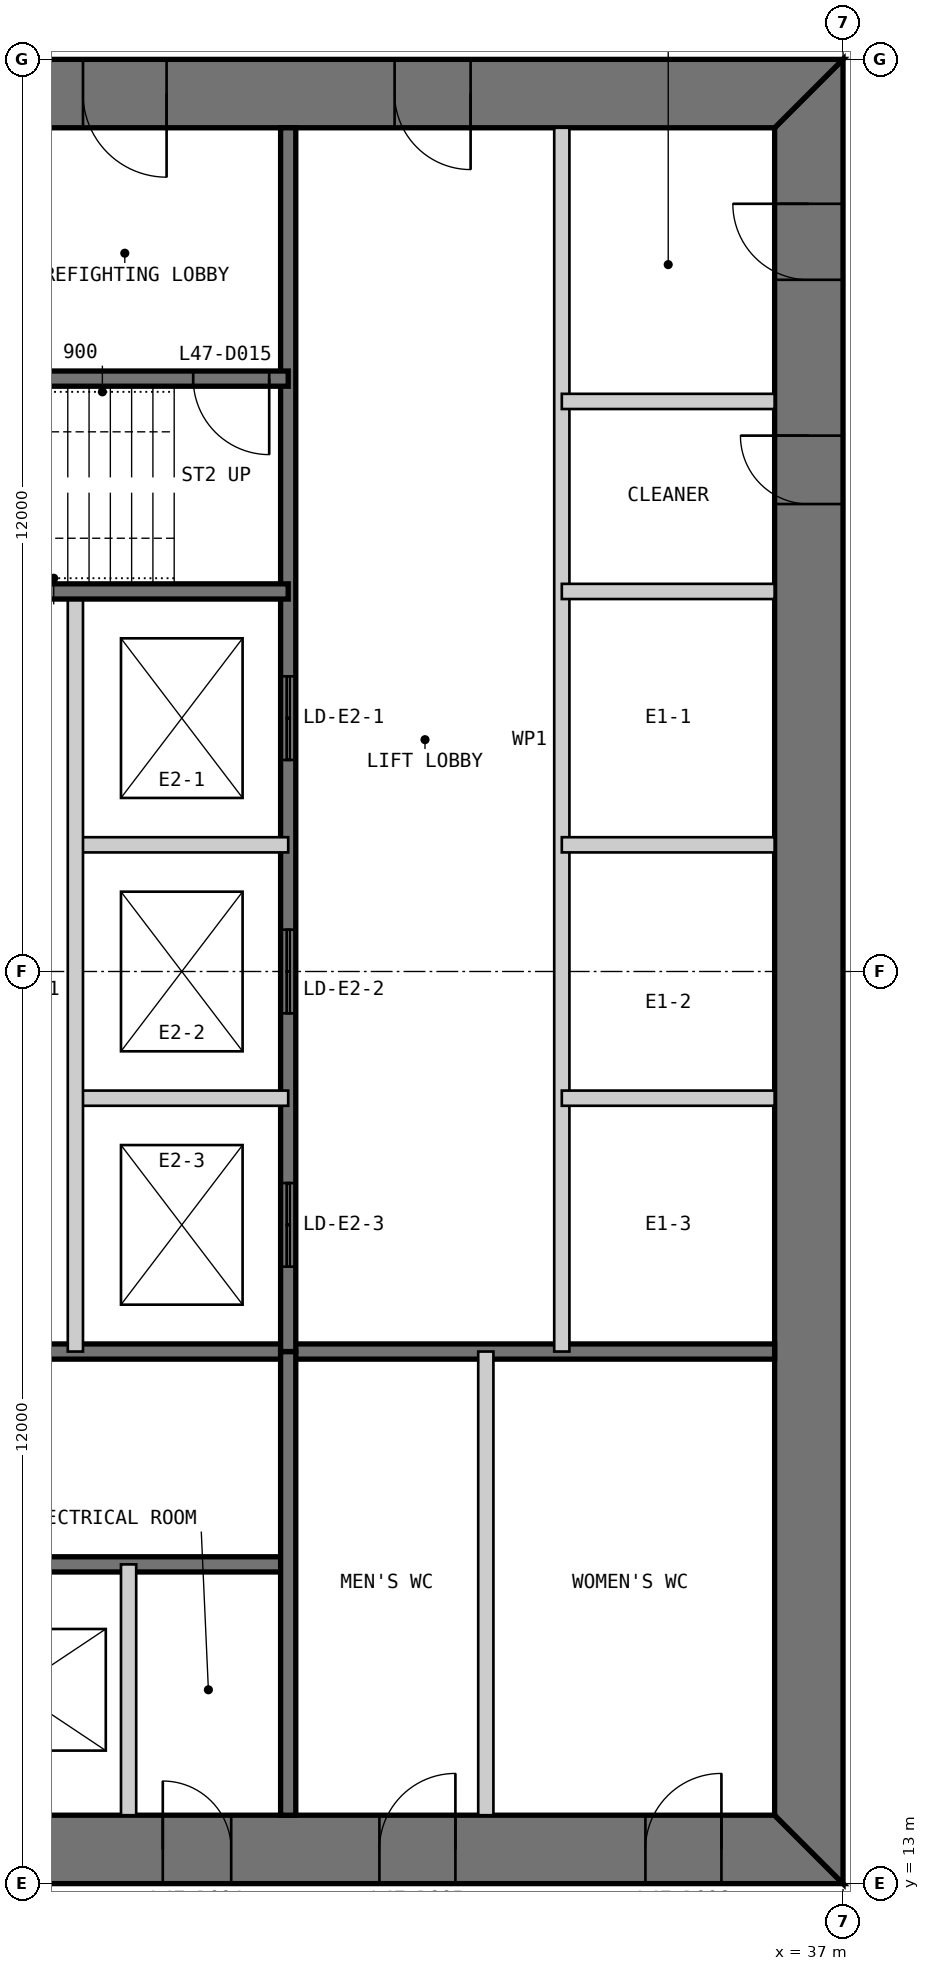
"""IFC4 building model, lengths in metres.
Left out: names, types, materials, properties, quantities, classifications, styles, units other than length and angle.
Written with IfcOpenShell. Run it as: python <this file> out.ifc"""

import sys

from ifc_helpers import new_model, si_unit, direction, frame, frame_2d, origin, place, context, subcontext, project, spatial, polyline, rectangle, outline, extrude, element, fill, save


model = new_model("IFC4")
c1 = context("Model", 3, precision=1e-05, world=origin(), true_north=direction((0.0, 1.0)))
c2 = subcontext(c1, "Body", "Model", "MODEL_VIEW")
j1 = project(units=[si_unit("LENGTHUNIT", "METRE"), si_unit("PLANEANGLEUNIT", "RADIAN")], contexts=[c1])
p1 = place(None, origin())
s1 = spatial("IfcSite", under=j1, at=p1, CompositionType="ELEMENT")
p2 = place(p1, origin())
s2 = spatial("IfcBuilding", under=s1, at=p2, CompositionType="ELEMENT")
p3 = place(p2, frame((0.0, 0.0, 201.8)))
s3 = spatial("IfcBuildingStorey", under=s2, at=p3, CompositionType="ELEMENT", Elevation=201.8)
p4 = place(p3, frame((13.0, 13.45, 0.0), z_axis=(0.0, 0.0, 1.0), x_axis=(1.0, 0.0, 0.0)))
e1 = element("IfcWall", 1, at=p4, inside=s3, PredefinedType="SHEAR", context=c2, shape_type="SweptSolid", body=[
    extrude(outline(polyline([(0.0, -0.45), (24.0, -0.45), (23.1, 0.45), (0.9, 0.45), (0.0, -0.45)])), origin(), (0.0, 0.0, 1.0), 4.0),
])
p5 = place(p4, frame((4.9, 0.0, 0.0)))
e2 = element("IfcOpeningElement", 2, at=p5, cuts=e1, PredefinedType="OPENING", context=c2, shape_type="SweptSolid", body=[
    extrude(rectangle(XDim=1.0, YDim=2.2, at=frame_2d((0.5, 1.1))), frame((0.0, 0.46, 0.0), z_axis=(0.0, -1.0, 0.0), x_axis=(1.0, 0.0, 0.0)), (0.0, 0.0, 1.0), 0.92),
])
p6 = place(p4, frame((8.9, 0.0, 0.0)))
e3 = element("IfcOpeningElement", 3, at=p6, cuts=e1, PredefinedType="OPENING", context=c2, shape_type="SweptSolid", body=[
    extrude(rectangle(XDim=1.1, YDim=2.2, at=frame_2d((0.55, 1.1))), frame((0.0, 0.46, 0.0), z_axis=(0.0, -1.0, 0.0), x_axis=(1.0, 0.0, 0.0)), (0.0, 0.0, 1.0), 0.92),
])
p7 = place(p4, frame((15.05, 0.0, 0.0)))
e4 = element("IfcOpeningElement", 4, at=p7, cuts=e1, PredefinedType="OPENING", context=c2, shape_type="SweptSolid", body=[
    extrude(rectangle(XDim=0.9, YDim=2.2, at=frame_2d((0.45, 1.1))), frame((0.0, 0.46, 0.0), z_axis=(0.0, -1.0, 0.0), x_axis=(1.0, 0.0, 0.0)), (0.0, 0.0, 1.0), 0.92),
])
p8 = place(p4, frame((17.9, 0.0, 0.0)))
e5 = element("IfcOpeningElement", 5, at=p8, cuts=e1, PredefinedType="OPENING", context=c2, shape_type="SweptSolid", body=[
    extrude(rectangle(XDim=1.0, YDim=2.2, at=frame_2d((0.5, 1.1))), frame((0.0, 0.46, 0.0), z_axis=(0.0, -1.0, 0.0), x_axis=(1.0, 0.0, 0.0)), (0.0, 0.0, 1.0), 0.92),
])
p9 = place(p4, frame((21.4, 0.0, 0.0)))
e6 = element("IfcOpeningElement", 6, at=p9, cuts=e1, PredefinedType="OPENING", context=c2, shape_type="SweptSolid", body=[
    extrude(rectangle(XDim=1.0, YDim=2.2, at=frame_2d((0.5, 1.1))), frame((0.0, 0.46, 0.0), z_axis=(0.0, -1.0, 0.0), x_axis=(1.0, 0.0, 0.0)), (0.0, 0.0, 1.0), 0.92),
])
p10 = place(p3, frame((36.55, 13.9, 0.0), z_axis=(0.0, 0.0, 1.0), x_axis=(0.0, 1.0, 0.0)))
e7 = element("IfcWall", 7, at=p10, inside=s3, PredefinedType="SHEAR", context=c2, shape_type="SweptSolid", body=[
    extrude(outline(polyline([(-0.9, -0.45), (23.1, -0.45), (22.2, 0.45), (0.0, 0.45), (-0.9, -0.45)])), origin(), (0.0, 0.0, 1.0), 4.0),
])
p11 = place(p10, frame((20.2, 0.0, 0.0)))
e8 = element("IfcOpeningElement", 8, at=p11, cuts=e7, PredefinedType="OPENING", context=c2, shape_type="SweptSolid", body=[
    extrude(rectangle(XDim=1.0, YDim=2.2, at=frame_2d((0.5, 1.1))), frame((0.0, 0.46, 0.0), z_axis=(0.0, -1.0, 0.0), x_axis=(1.0, 0.0, 0.0)), (0.0, 0.0, 1.0), 0.92),
])
p12 = place(p10, frame((17.25, 0.0, 0.0)))
e9 = element("IfcOpeningElement", 9, at=p12, cuts=e7, PredefinedType="OPENING", context=c2, shape_type="SweptSolid", body=[
    extrude(rectangle(XDim=0.9, YDim=2.2, at=frame_2d((0.45, 1.1))), frame((0.0, 0.46, 0.0), z_axis=(0.0, -1.0, 0.0), x_axis=(1.0, 0.0, 0.0)), (0.0, 0.0, 1.0), 0.92),
])
p13 = place(p3, frame((37.0, 36.55, 0.0), z_axis=(0.0, 0.0, 1.0), x_axis=(-1.0, 0.0, 0.0)))
e10 = element("IfcWall", 10, at=p13, inside=s3, PredefinedType="SHEAR", context=c2, shape_type="SweptSolid", body=[
    extrude(outline(polyline([(0.0, -0.45), (24.0, -0.45), (23.1, 0.45), (0.9, 0.45), (0.0, -0.45)])), origin(), (0.0, 0.0, 1.0), 4.0),
])
p14 = place(p13, frame((4.9, 0.0, 0.0)))
e11 = element("IfcOpeningElement", 11, at=p14, cuts=e10, PredefinedType="OPENING", context=c2, shape_type="SweptSolid", body=[
    extrude(rectangle(XDim=1.0, YDim=2.2, at=frame_2d((0.5, 1.1))), frame((0.0, 0.46, 0.0), z_axis=(0.0, -1.0, 0.0), x_axis=(1.0, 0.0, 0.0)), (0.0, 0.0, 1.0), 0.92),
])
p15 = place(p13, frame((8.9, 0.0, 0.0)))
e12 = element("IfcOpeningElement", 12, at=p15, cuts=e10, PredefinedType="OPENING", context=c2, shape_type="SweptSolid", body=[
    extrude(rectangle(XDim=1.1, YDim=2.2, at=frame_2d((0.55, 1.1))), frame((0.0, 0.46, 0.0), z_axis=(0.0, -1.0, 0.0), x_axis=(1.0, 0.0, 0.0)), (0.0, 0.0, 1.0), 0.92),
])
p16 = place(p13, frame((15.05, 0.0, 0.0)))
e13 = element("IfcOpeningElement", 13, at=p16, cuts=e10, PredefinedType="OPENING", context=c2, shape_type="SweptSolid", body=[
    extrude(rectangle(XDim=0.9, YDim=2.2, at=frame_2d((0.45, 1.1))), frame((0.0, 0.46, 0.0), z_axis=(0.0, -1.0, 0.0), x_axis=(1.0, 0.0, 0.0)), (0.0, 0.0, 1.0), 0.92),
])
p17 = place(p13, frame((17.9, 0.0, 0.0)))
e14 = element("IfcOpeningElement", 14, at=p17, cuts=e10, PredefinedType="OPENING", context=c2, shape_type="SweptSolid", body=[
    extrude(rectangle(XDim=1.0, YDim=2.2, at=frame_2d((0.5, 1.1))), frame((0.0, 0.46, 0.0), z_axis=(0.0, -1.0, 0.0), x_axis=(1.0, 0.0, 0.0)), (0.0, 0.0, 1.0), 0.92),
])
p18 = place(p13, frame((21.4, 0.0, 0.0)))
e15 = element("IfcOpeningElement", 15, at=p18, cuts=e10, PredefinedType="OPENING", context=c2, shape_type="SweptSolid", body=[
    extrude(rectangle(XDim=1.0, YDim=2.2, at=frame_2d((0.5, 1.1))), frame((0.0, 0.46, 0.0), z_axis=(0.0, -1.0, 0.0), x_axis=(1.0, 0.0, 0.0)), (0.0, 0.0, 1.0), 0.92),
])
p19 = place(p3, frame((20.3, 17.2, 0.0), z_axis=(0.0, 0.0, 1.0), x_axis=(1.0, 0.0, 0.0)))
e16 = element("IfcWall", 16, at=p19, inside=s3, PredefinedType="SOLIDWALL", context=c2, shape_type="SweptSolid", body=[
    extrude(rectangle(XDim=9.4, YDim=0.2, at=frame_2d((4.7, 0.0))), origin(), (0.0, 0.0, 1.0), 3.8),
])
p20 = place(p19, frame((0.25, 0.0, 0.0)))
e17 = element("IfcOpeningElement", 17, at=p20, cuts=e16, PredefinedType="OPENING", context=c2, shape_type="SweptSolid", body=[
    extrude(rectangle(XDim=1.0, YDim=2.2, at=frame_2d((0.5, 1.1))), frame((0.0, 0.11, 0.0), z_axis=(0.0, -1.0, 0.0), x_axis=(1.0, 0.0, 0.0)), (0.0, 0.0, 1.0), 0.22),
])
p21 = place(p3, frame((20.3, 20.0, 0.0), z_axis=(0.0, 0.0, 1.0), x_axis=(1.0, 0.0, 0.0)))
e18 = element("IfcWall", 18, at=p21, inside=s3, PredefinedType="SOLIDWALL", context=c2, shape_type="SweptSolid", body=[
    extrude(rectangle(XDim=15.8, YDim=0.2, at=frame_2d((7.9, 0.0))), origin(), (0.0, 0.0, 1.0), 3.8),
])
p22 = place(p3, frame((27.6, 13.9, 0.0), z_axis=(0.0, 0.0, 1.0), x_axis=(0.0, 1.0, 0.0)))
e19 = element("IfcWall", 19, at=p22, inside=s3, PredefinedType="PARTITIONING", context=c2, shape_type="SweptSolid", body=[
    extrude(rectangle(XDim=3.3, YDim=0.2, at=frame_2d((1.65, 0.0))), origin(), (0.0, 0.0, 1.0), 3.8),
])
p23 = place(p3, frame((29.7, 13.9, 0.0), z_axis=(0.0, 0.0, 1.0), x_axis=(0.0, 1.0, 0.0)))
e20 = element("IfcWall", 20, at=p23, inside=s3, PredefinedType="SOLIDWALL", context=c2, shape_type="SweptSolid", body=[
    extrude(rectangle(XDim=6.1, YDim=0.2, at=frame_2d((3.05, 0.0))), origin(), (0.0, 0.0, 1.0), 3.8),
])
p24 = place(p3, frame((32.3, 13.9, 0.0), z_axis=(0.0, 0.0, 1.0), x_axis=(0.0, 1.0, 0.0)))
e21 = element("IfcWall", 21, at=p24, inside=s3, PredefinedType="PARTITIONING", context=c2, shape_type="SweptSolid", body=[
    extrude(rectangle(XDim=6.1, YDim=0.2, at=frame_2d((3.05, 0.0))), origin(), (0.0, 0.0, 1.0), 3.8),
])
p25 = place(p3, frame((33.3, 36.1, 0.0), z_axis=(0.0, 0.0, 1.0), x_axis=(0.0, -1.0, 0.0)))
e22 = element("IfcWall", 22, at=p25, inside=s3, PredefinedType="PARTITIONING", context=c2, shape_type="SweptSolid", body=[
    extrude(rectangle(XDim=16.1, YDim=0.2, at=frame_2d((8.05, 0.0))), origin(), (0.0, 0.0, 1.0), 3.8),
])
p26 = place(p3, frame((29.7, 36.1, 0.0), z_axis=(0.0, 0.0, 1.0), x_axis=(0.0, -1.0, 0.0)))
e23 = element("IfcWall", 23, at=p26, inside=s3, PredefinedType="SOLIDWALL", context=c2, shape_type="SweptSolid", body=[
    extrude(rectangle(XDim=16.1, YDim=0.2, at=frame_2d((8.05, 0.0))), origin(), (0.0, 0.0, 1.0), 3.8),
])
p27 = place(p26, frame((7.217, 0.0, 0.0)))
e24 = element("IfcOpeningElement", 24, at=p27, cuts=e23, PredefinedType="OPENING", context=c2, shape_type="SweptSolid", body=[
    extrude(rectangle(XDim=1.1, YDim=2.2, at=frame_2d((0.55, 1.1))), frame((0.0, 0.11, 0.0), z_axis=(0.0, -1.0, 0.0), x_axis=(1.0, 0.0, 0.0)), (0.0, 0.0, 1.0), 0.22),
])
p28 = place(p26, frame((10.55, 0.0, 0.0)))
e25 = element("IfcOpeningElement", 25, at=p28, cuts=e23, PredefinedType="OPENING", context=c2, shape_type="SweptSolid", body=[
    extrude(rectangle(XDim=1.1, YDim=2.2, at=frame_2d((0.55, 1.1))), frame((0.0, 0.11, 0.0), z_axis=(0.0, -1.0, 0.0), x_axis=(1.0, 0.0, 0.0)), (0.0, 0.0, 1.0), 0.22),
])
p29 = place(p26, frame((13.883, 0.0, 0.0)))
e26 = element("IfcOpeningElement", 26, at=p29, cuts=e23, PredefinedType="OPENING", context=c2, shape_type="SweptSolid", body=[
    extrude(rectangle(XDim=1.1, YDim=2.2, at=frame_2d((0.55, 1.1))), frame((0.0, 0.11, 0.0), z_axis=(0.0, -1.0, 0.0), x_axis=(1.0, 0.0, 0.0)), (0.0, 0.0, 1.0), 0.22),
])
for number, where, z_axis, x_axis in (
    (27, (36.1, 30.0, 0.0), (0.0, 0.0, 1.0), (-1.0, 0.0, 0.0)),
    (28, (36.1, 26.667, 0.0), (0.0, 0.0, 1.0), (-1.0, 0.0, 0.0)),
    (29, (36.1, 23.333, 0.0), (0.0, 0.0, 1.0), (-1.0, 0.0, 0.0)),
    (30, (29.7, 26.667, 0.0), (0.0, 0.0, 1.0), (-1.0, 0.0, 0.0)),
    (31, (29.7, 23.333, 0.0), (0.0, 0.0, 1.0), (-1.0, 0.0, 0.0)),
):
    element("IfcWall", number, at=place(p3, frame(where, z_axis=z_axis, x_axis=x_axis)), inside=s3, PredefinedType="PARTITIONING", context=c2, shape_type="SweptSolid", body=[
        extrude(rectangle(XDim=2.8, YDim=0.2, at=frame_2d((1.4, 0.0))), origin(), (0.0, 0.0, 1.0), 3.8),
    ])
p30 = place(p3, frame((26.9, 30.0, 0.0), z_axis=(0.0, 0.0, 1.0), x_axis=(0.0, -1.0, 0.0)))
e32 = element("IfcWall", 32, at=p30, inside=s3, PredefinedType="PARTITIONING", context=c2, shape_type="SweptSolid", body=[
    extrude(rectangle(XDim=10.0, YDim=0.2, at=frame_2d((5.0, 0.0))), origin(), (0.0, 0.0, 1.0), 3.8),
])
p31 = place(p3, frame((29.7, 32.8, 0.0), z_axis=(0.0, 0.0, 1.0), x_axis=(-1.0, 0.0, 0.0)))
e33 = element("IfcWall", 33, at=p31, inside=s3, PredefinedType="SOLIDWALL", context=c2, shape_type="SweptSolid", body=[
    extrude(rectangle(XDim=9.4, YDim=0.2, at=frame_2d((4.7, 0.0))), origin(), (0.0, 0.0, 1.0), 3.8),
])
p32 = place(p31, frame((0.25, 0.0, 0.0)))
e34 = element("IfcOpeningElement", 34, at=p32, cuts=e33, PredefinedType="OPENING", context=c2, shape_type="SweptSolid", body=[
    extrude(rectangle(XDim=1.0, YDim=2.2, at=frame_2d((0.5, 1.1))), frame((0.0, 0.11, 0.0), z_axis=(0.0, -1.0, 0.0), x_axis=(1.0, 0.0, 0.0)), (0.0, 0.0, 1.0), 0.22),
])
p33 = place(p3, frame((29.7, 30.0, 0.0), z_axis=(0.0, 0.0, 1.0), x_axis=(-1.0, 0.0, 0.0)))
e35 = element("IfcWall", 35, at=p33, inside=s3, PredefinedType="SOLIDWALL", context=c2, shape_type="SweptSolid", body=[
    extrude(rectangle(XDim=15.8, YDim=0.2, at=frame_2d((7.9, 0.0))), origin(), (0.0, 0.0, 1.0), 3.8),
])
p34 = place(p3, frame((36.1, 32.5, 0.0), z_axis=(0.0, 0.0, 1.0), x_axis=(-1.0, 0.0, 0.0)))
e36 = element("IfcWall", 36, at=p34, inside=s3, PredefinedType="PARTITIONING", context=c2, shape_type="SweptSolid", body=[
    extrude(rectangle(XDim=2.8, YDim=0.2, at=frame_2d((1.4, 0.0))), origin(), (0.0, 0.0, 1.0), 3.8),
])
p35 = place(p7, origin())
e37 = element("IfcDoor", 37, at=p35, inside=s3, OperationType="SINGLE_SWING_LEFT", PredefinedType="DOOR", context=c2, shape_type="SweptSolid", body=[
    extrude(rectangle(XDim=0.9, YDim=2.2, at=frame_2d((0.45, 1.1))), frame((0.0, 0.025, 0.0), z_axis=(0.0, -1.0, 0.0), x_axis=(1.0, 0.0, 0.0)), (0.0, 0.0, 1.0), 0.05),
    extrude(outline(polyline([(0.0, 0.0), (0.04, 0.0), (0.04, 2.16), (0.86, 2.16), (0.86, 0.0), (0.9, 0.0), (0.9, 2.2), (0.0, 2.2), (0.0, 0.0)])), frame((0.0, 0.3, 0.0), z_axis=(0.0, -1.0, 0.0), x_axis=(1.0, 0.0, 0.0)), (0.0, 0.0, 1.0), 0.6),
])
fill(e4, e37)
p36 = place(p8, origin())
e38 = element("IfcDoor", 38, at=p36, inside=s3, OperationType="SINGLE_SWING_RIGHT", PredefinedType="DOOR", context=c2, shape_type="SweptSolid", body=[
    extrude(rectangle(XDim=1.0, YDim=2.2, at=frame_2d((0.5, 1.1))), frame((0.0, 0.025, 0.0), z_axis=(0.0, -1.0, 0.0), x_axis=(1.0, 0.0, 0.0)), (0.0, 0.0, 1.0), 0.05),
    extrude(outline(polyline([(0.0, 0.0), (0.04, 0.0), (0.04, 2.16), (0.96, 2.16), (0.96, 0.0), (1.0, 0.0), (1.0, 2.2), (0.0, 2.2), (0.0, 0.0)])), frame((0.0, 0.3, 0.0), z_axis=(0.0, -1.0, 0.0), x_axis=(1.0, 0.0, 0.0)), (0.0, 0.0, 1.0), 0.6),
])
fill(e5, e38)
p37 = place(p9, origin())
e39 = element("IfcDoor", 39, at=p37, inside=s3, OperationType="SINGLE_SWING_RIGHT", PredefinedType="DOOR", context=c2, shape_type="SweptSolid", body=[
    extrude(rectangle(XDim=1.0, YDim=2.2, at=frame_2d((0.5, 1.1))), frame((0.0, 0.025, 0.0), z_axis=(0.0, -1.0, 0.0), x_axis=(1.0, 0.0, 0.0)), (0.0, 0.0, 1.0), 0.05),
    extrude(outline(polyline([(0.0, 0.0), (0.04, 0.0), (0.04, 2.16), (0.96, 2.16), (0.96, 0.0), (1.0, 0.0), (1.0, 2.2), (0.0, 2.2), (0.0, 0.0)])), frame((0.0, 0.3, 0.0), z_axis=(0.0, -1.0, 0.0), x_axis=(1.0, 0.0, 0.0)), (0.0, 0.0, 1.0), 0.6),
])
fill(e6, e39)
p38 = place(p14, origin())
e40 = element("IfcDoor", 40, at=p38, inside=s3, OperationType="SINGLE_SWING_LEFT", PredefinedType="DOOR", context=c2, shape_type="SweptSolid", body=[
    extrude(rectangle(XDim=1.0, YDim=2.2, at=frame_2d((0.5, 1.1))), frame((0.0, 0.025, 0.0), z_axis=(0.0, -1.0, 0.0), x_axis=(1.0, 0.0, 0.0)), (0.0, 0.0, 1.0), 0.05),
    extrude(outline(polyline([(0.0, 0.0), (0.04, 0.0), (0.04, 2.16), (0.96, 2.16), (0.96, 0.0), (1.0, 0.0), (1.0, 2.2), (0.0, 2.2), (0.0, 0.0)])), frame((0.0, 0.3, 0.0), z_axis=(0.0, -1.0, 0.0), x_axis=(1.0, 0.0, 0.0)), (0.0, 0.0, 1.0), 0.6),
])
fill(e11, e40)
p39 = place(p15, origin())
e41 = element("IfcDoor", 41, at=p39, inside=s3, OperationType="SINGLE_SWING_LEFT", PredefinedType="DOOR", context=c2, shape_type="SweptSolid", body=[
    extrude(rectangle(XDim=1.1, YDim=2.2, at=frame_2d((0.55, 1.1))), frame((0.0, 0.025, 0.0), z_axis=(0.0, -1.0, 0.0), x_axis=(1.0, 0.0, 0.0)), (0.0, 0.0, 1.0), 0.05),
    extrude(outline(polyline([(0.0, 0.0), (0.04, 0.0), (0.04, 2.16), (1.06, 2.16), (1.06, 0.0), (1.1, 0.0), (1.1, 2.2), (0.0, 2.2), (0.0, 0.0)])), frame((0.0, 0.3, 0.0), z_axis=(0.0, -1.0, 0.0), x_axis=(1.0, 0.0, 0.0)), (0.0, 0.0, 1.0), 0.6),
])
fill(e12, e41)
p40 = place(p32, origin())
e42 = element("IfcDoor", 42, at=p40, inside=s3, OperationType="SINGLE_SWING_LEFT", PredefinedType="DOOR", context=c2, shape_type="SweptSolid", body=[
    extrude(rectangle(XDim=1.0, YDim=2.2, at=frame_2d((0.5, 1.1))), frame((0.0, 0.025, 0.0), z_axis=(0.0, -1.0, 0.0), x_axis=(1.0, 0.0, 0.0)), (0.0, 0.0, 1.0), 0.05),
])
fill(e34, e42)
p41 = place(p11, origin())
e43 = element("IfcDoor", 43, at=p41, inside=s3, OperationType="SINGLE_SWING_RIGHT", PredefinedType="DOOR", context=c2, shape_type="SweptSolid", body=[
    extrude(rectangle(XDim=1.0, YDim=2.2, at=frame_2d((0.5, 1.1))), frame((0.0, 0.025, 0.0), z_axis=(0.0, -1.0, 0.0), x_axis=(1.0, 0.0, 0.0)), (0.0, 0.0, 1.0), 0.05),
    extrude(outline(polyline([(0.0, 0.0), (0.04, 0.0), (0.04, 2.16), (0.96, 2.16), (0.96, 0.0), (1.0, 0.0), (1.0, 2.2), (0.0, 2.2), (0.0, 0.0)])), frame((0.0, 0.3, 0.0), z_axis=(0.0, -1.0, 0.0), x_axis=(1.0, 0.0, 0.0)), (0.0, 0.0, 1.0), 0.6),
])
fill(e8, e43)
p42 = place(p12, origin())
e44 = element("IfcDoor", 44, at=p42, inside=s3, OperationType="SINGLE_SWING_RIGHT", PredefinedType="DOOR", context=c2, shape_type="SweptSolid", body=[
    extrude(rectangle(XDim=0.9, YDim=2.2, at=frame_2d((0.45, 1.1))), frame((0.0, 0.025, 0.0), z_axis=(0.0, -1.0, 0.0), x_axis=(1.0, 0.0, 0.0)), (0.0, 0.0, 1.0), 0.05),
    extrude(outline(polyline([(0.0, 0.0), (0.04, 0.0), (0.04, 2.16), (0.86, 2.16), (0.86, 0.0), (0.9, 0.0), (0.9, 2.2), (0.0, 2.2), (0.0, 0.0)])), frame((0.0, 0.3, 0.0), z_axis=(0.0, -1.0, 0.0), x_axis=(1.0, 0.0, 0.0)), (0.0, 0.0, 1.0), 0.6),
])
fill(e9, e44)
p43 = place(p27, origin())
e45 = element("IfcDoor", 45, at=p43, inside=s3, OperationType="DOUBLE_DOOR_SLIDING", PredefinedType="DOOR", context=c2, shape_type="SweptSolid", body=[
    extrude(rectangle(XDim=1.1, YDim=2.2, at=frame_2d((0.55, 1.1))), frame((0.0, 0.025, 0.0), z_axis=(0.0, -1.0, 0.0), x_axis=(1.0, 0.0, 0.0)), (0.0, 0.0, 1.0), 0.05),
])
fill(e24, e45)
p44 = place(p28, origin())
e46 = element("IfcDoor", 46, at=p44, inside=s3, OperationType="DOUBLE_DOOR_SLIDING", PredefinedType="DOOR", context=c2, shape_type="SweptSolid", body=[
    extrude(rectangle(XDim=1.1, YDim=2.2, at=frame_2d((0.55, 1.1))), frame((0.0, 0.025, 0.0), z_axis=(0.0, -1.0, 0.0), x_axis=(1.0, 0.0, 0.0)), (0.0, 0.0, 1.0), 0.05),
])
fill(e25, e46)
p45 = place(p29, origin())
e47 = element("IfcDoor", 47, at=p45, inside=s3, OperationType="DOUBLE_DOOR_SLIDING", PredefinedType="DOOR", context=c2, shape_type="SweptSolid", body=[
    extrude(rectangle(XDim=1.1, YDim=2.2, at=frame_2d((0.55, 1.1))), frame((0.0, 0.025, 0.0), z_axis=(0.0, -1.0, 0.0), x_axis=(1.0, 0.0, 0.0)), (0.0, 0.0, 1.0), 0.05),
])
fill(e26, e47)
save(model, sys.argv[1])
